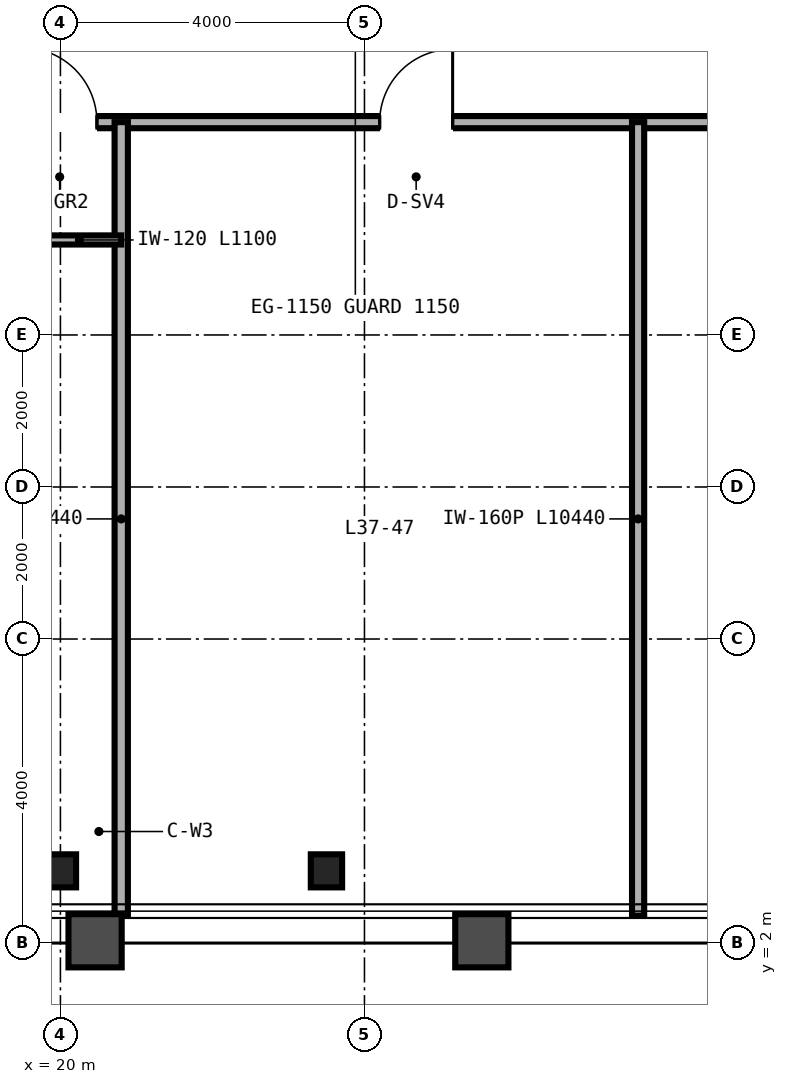
"""IFC4 building model, lengths in metres.
Left out: names, types, materials, properties, quantities, classifications, styles, units other than length and angle.
Written with IfcOpenShell. Run it as: python <this file> out.ifc"""

import sys

from ifc_helpers import new_model, si_unit, direction, frame, frame_2d, origin, origin_2d, place, context, subcontext, project, spatial, rectangle, i_section, extrude, source, transform, mapped, element, fill, save


model = new_model("IFC4")
c1 = context("Model", 3, precision=1e-05, world=origin(), true_north=direction((0.0, 1.0)))
c2 = subcontext(c1, "Body", "Model", "MODEL_VIEW")
j1 = project(units=[si_unit("LENGTHUNIT", "METRE"), si_unit("PLANEANGLEUNIT", "RADIAN")], contexts=[c1])
p1 = place(None, origin())
s1 = spatial("IfcSite", under=j1, at=p1, CompositionType="ELEMENT")
p2 = place(p1, origin())
s2 = spatial("IfcBuilding", under=s1, at=p2, CompositionType="ELEMENT")
p3 = place(p2, frame((0.0, 0.0, 147.6)))
s3 = spatial("IfcBuildingStorey", under=s2, at=p3, CompositionType="ELEMENT", Elevation=147.6)
m1 = source(origin(), c2, "Body", "SweptSolid", [
    extrude(i_section(OverallWidth=0.412, OverallDepth=0.435, WebThickness=0.036, FlangeThickness=0.057, FilletRadius=0.025, at=origin_2d()), origin(), (0.0, 0.0, 1.0), 3.28),
])
for number, where, z_axis, x_axis in (
    (1, (20.0, 2.95, 0.0), (0.0, 0.0, 1.0), (1.0, 0.0, 0.0)),
    (2, (23.5, 2.95, 0.0), (0.0, 0.0, 1.0), (1.0, 0.0, 0.0)),
):
    element("IfcColumn", number, at=place(p3, frame(where, z_axis=z_axis, x_axis=x_axis)), inside=s3, PredefinedType="COLUMN", context=c2, shape_type="MappedRepresentation", body=[
        mapped(m1, transform((0.0, 0.0, 0.0), scale=1.0)),
    ])
p4 = place(p3, frame((14.0, 12.8, 0.0), z_axis=(0.0, 0.0, 1.0), x_axis=(1.0, 0.0, 0.0)))
e3 = element("IfcWall", 3, at=p4, inside=s3, PredefinedType="PARTITIONING", context=c2, shape_type="SweptSolid", body=[
    extrude(rectangle(XDim=36.0, YDim=0.16, at=frame_2d((18.0, 0.0))), origin(), (0.0, 0.0, 1.0), 2.501),
])
p5 = place(p4, frame((5.5, 0.0, 0.0)))
e4 = element("IfcOpeningElement", 4, at=p5, cuts=e3, PredefinedType="OPENING", context=c2, shape_type="SweptSolid", body=[
    extrude(rectangle(XDim=0.98, YDim=2.2, at=frame_2d((0.49, 1.1))), frame((0.0, 0.09, 0.0), z_axis=(0.0, -1.0, 0.0), x_axis=(1.0, 0.0, 0.0)), (0.0, 0.0, 1.0), 0.18),
])
p6 = place(p4, frame((10.2, 0.0, 0.0)))
e5 = element("IfcOpeningElement", 5, at=p6, cuts=e3, PredefinedType="OPENING", context=c2, shape_type="SweptSolid", body=[
    extrude(rectangle(XDim=0.96, YDim=2.15, at=frame_2d((0.48, 1.075))), frame((0.0, 0.09, 0.0), z_axis=(0.0, -1.0, 0.0), x_axis=(1.0, 0.0, 0.0)), (0.0, 0.0, 1.0), 0.18),
])
p7 = place(p4, frame((16.72, 0.0, 0.0)))
e6 = element("IfcOpeningElement", 6, at=p7, cuts=e3, PredefinedType="OPENING", context=c2, shape_type="SweptSolid", body=[
    extrude(rectangle(XDim=0.96, YDim=2.15, at=frame_2d((0.48, 1.075))), frame((0.0, 0.09, 0.0), z_axis=(0.0, -1.0, 0.0), x_axis=(1.0, 0.0, 0.0)), (0.0, 0.0, 1.0), 0.18),
])
p8 = place(p4, frame((27.14, 0.0, 0.0)))
e7 = element("IfcOpeningElement", 7, at=p8, cuts=e3, PredefinedType="OPENING", context=c2, shape_type="SweptSolid", body=[
    extrude(rectangle(XDim=0.94, YDim=2.15, at=frame_2d((0.47, 1.075))), frame((0.0, 0.09, 0.0), z_axis=(0.0, -1.0, 0.0), x_axis=(1.0, 0.0, 0.0)), (0.0, 0.0, 1.0), 0.18),
])
p9 = place(p4, frame((34.74, 0.0, 0.0)))
e8 = element("IfcOpeningElement", 8, at=p9, cuts=e3, PredefinedType="OPENING", context=c2, shape_type="SweptSolid", body=[
    extrude(rectangle(XDim=0.94, YDim=2.15, at=frame_2d((0.47, 1.075))), frame((0.0, 0.09, 0.0), z_axis=(0.0, -1.0, 0.0), x_axis=(1.0, 0.0, 0.0)), (0.0, 0.0, 1.0), 0.18),
])
p10 = place(p3, frame((20.8, 2.36, 0.0), z_axis=(0.0, 0.0, 1.0), x_axis=(0.0, 1.0, 0.0)))
e9 = element("IfcWall", 9, at=p10, inside=s3, PredefinedType="PARTITIONING", context=c2, shape_type="SweptSolid", body=[
    extrude(rectangle(XDim=10.44, YDim=0.175, at=frame_2d((5.22, 0.0))), origin(), (0.0, 0.0, 1.0), 2.743),
])
p11 = place(p3, frame((19.7, 11.25, 0.0), z_axis=(0.0, 0.0, 1.0), x_axis=(1.0, 0.0, 0.0)))
e10 = element("IfcWall", 10, at=p11, inside=s3, PredefinedType="PARTITIONING", context=c2, shape_type="SweptSolid", body=[
    extrude(rectangle(XDim=1.1, YDim=0.12, at=frame_2d((0.55, 0.0))), origin(), (0.0, 0.0, 1.0), 3.28),
])
p12 = place(p3, frame((27.6, 2.36, 0.0), z_axis=(0.0, 0.0, 1.0), x_axis=(0.0, 1.0, 0.0)))
e11 = element("IfcWall", 11, at=p12, inside=s3, PredefinedType="PARTITIONING", context=c2, shape_type="SweptSolid", body=[
    extrude(rectangle(XDim=10.44, YDim=0.16, at=frame_2d((5.22, 0.0))), origin(), (0.0, 0.0, 1.0), 2.36),
])
m2 = source(origin(), c2, "Body", "SweptSolid", [
    extrude(rectangle(XDim=0.98, YDim=2.2, at=frame_2d((0.49, 1.1))), frame((0.0, 0.025, 0.0), z_axis=(0.0, -1.0, 0.0), x_axis=(1.0, 0.0, 0.0)), (0.0, 0.0, 1.0), 0.05),
])
p13 = place(p5, origin())
e12 = element("IfcDoor", 12, at=p13, inside=s3, OperationType="SINGLE_SWING_LEFT", PredefinedType="DOOR", context=c2, shape_type="MappedRepresentation", body=[
    mapped(m2, transform((0.0, 0.0, 0.0), scale=1.0)),
])
fill(e4, e12)
m3 = source(origin(), c2, "Body", "SweptSolid", [
    extrude(rectangle(XDim=0.96, YDim=2.15, at=frame_2d((0.48, 1.075))), frame((0.0, 0.025, 0.0), z_axis=(0.0, -1.0, 0.0), x_axis=(1.0, 0.0, 0.0)), (0.0, 0.0, 1.0), 0.05),
])
p14 = place(p6, origin())
e13 = element("IfcDoor", 13, at=p14, inside=s3, OperationType="SINGLE_SWING_RIGHT", PredefinedType="DOOR", context=c2, shape_type="MappedRepresentation", body=[
    mapped(m3, transform((0.0, 0.0, 0.0), scale=1.0)),
])
fill(e5, e13)
save(model, sys.argv[1])
